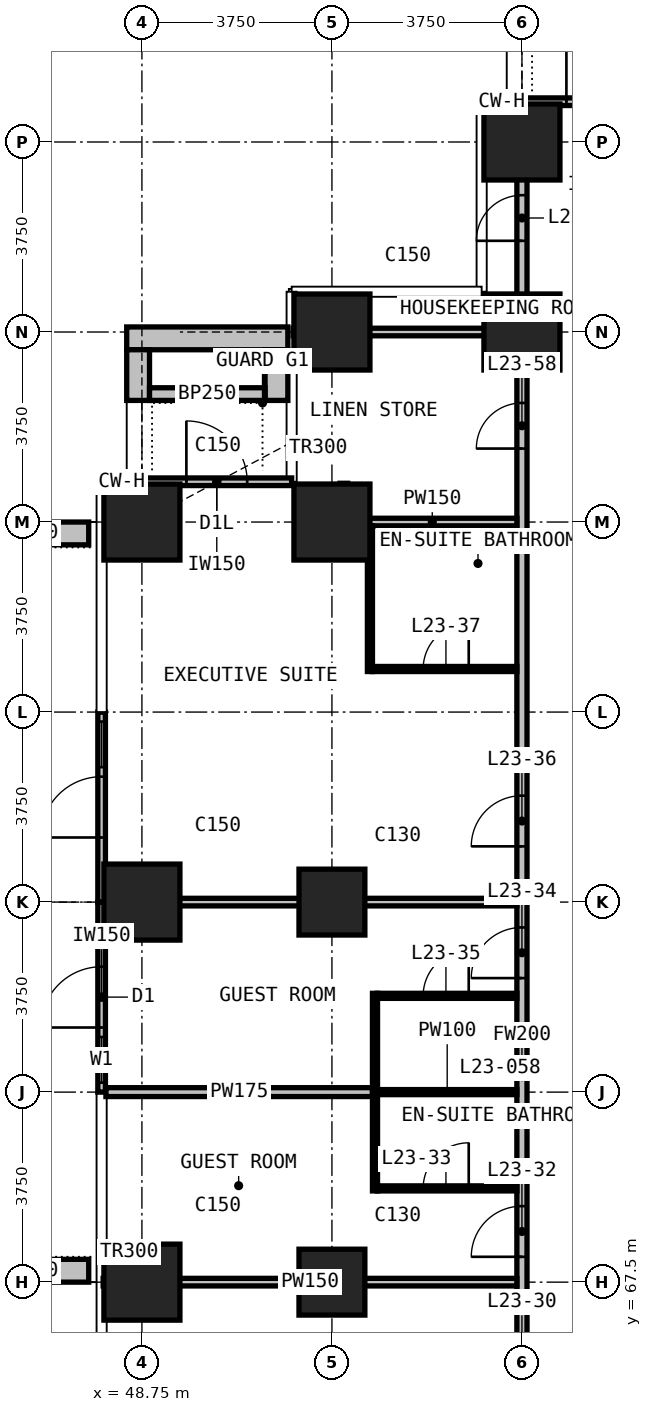
"""IFC4 building model, lengths in metres.
Left out: names, types, materials, properties, quantities, classifications, styles, units other than length and angle.
Written with IfcOpenShell. Run it as: python <this file> out.ifc"""

import sys

from ifc_helpers import new_model, si_unit, direction, frame, frame_2d, origin, origin_2d, place, context, subcontext, project, spatial, rectangle, extrude, element, fill, save


model = new_model("IFC4")
c1 = context("Model", 3, precision=1e-05, world=origin(), true_north=direction((0.0, 1.0)))
c2 = subcontext(c1, "Body", "Model", "MODEL_VIEW")
j1 = project(units=[si_unit("LENGTHUNIT", "METRE"), si_unit("PLANEANGLEUNIT", "RADIAN")], contexts=[c1])
p1 = place(None, origin())
s1 = spatial("IfcSite", under=j1, at=p1, CompositionType="ELEMENT")
p2 = place(p1, origin())
s2 = spatial("IfcBuilding", under=s1, at=p2, CompositionType="ELEMENT")
p3 = place(p2, frame((0.0, 0.0, 95.6)))
s3 = spatial("IfcBuildingStorey", under=s2, at=p3, CompositionType="ELEMENT", Elevation=95.6)
for number, where, z_axis, x_axis in (
    (1, (48.75, 67.5, 0.0), (0.0, 0.0, 1.0), (1.0, 0.0, 0.0)),
    (2, (48.75, 75.0, 0.0), (0.0, 0.0, 1.0), (1.0, 0.0, 0.0)),
    (3, (48.75, 82.5, 0.0), (0.0, 0.0, 1.0), (1.0, 0.0, 0.0)),
):
    element("IfcColumn", number, at=place(p3, frame(where, z_axis=z_axis, x_axis=x_axis)), inside=s3, PredefinedType="COLUMN", context=c2, shape_type="SweptSolid", body=[
        extrude(rectangle(XDim=1.5, YDim=1.5, at=origin_2d()), origin(), (0.0, 0.0, 1.0), 3.3),
    ])
for number, where, z_axis, x_axis in (
    (4, (52.5, 67.5, 0.0), (0.0, 0.0, 1.0), (1.0, 0.0, 0.0)),
    (5, (52.5, 75.0, 0.0), (0.0, 0.0, 1.0), (1.0, 0.0, 0.0)),
):
    element("IfcColumn", number, at=place(p3, frame(where, z_axis=z_axis, x_axis=x_axis)), inside=s3, PredefinedType="COLUMN", context=c2, shape_type="SweptSolid", body=[
        extrude(rectangle(XDim=1.3, YDim=1.3, at=origin_2d()), origin(), (0.0, 0.0, 1.0), 3.3),
    ])
for number, where, z_axis, x_axis in (
    (6, (52.5, 82.5, 0.0), (0.0, 0.0, 1.0), (1.0, 0.0, 0.0)),
    (7, (52.5, 86.25, 0.0), (0.0, 0.0, 1.0), (1.0, 0.0, 0.0)),
    (8, (56.25, 86.25, 0.0), (0.0, 0.0, 1.0), (1.0, 0.0, 0.0)),
    (9, (56.25, 90.0, 0.0), (0.0, 0.0, 1.0), (1.0, 0.0, 0.0)),
):
    element("IfcColumn", number, at=place(p3, frame(where, z_axis=z_axis, x_axis=x_axis)), inside=s3, PredefinedType="COLUMN", context=c2, shape_type="SweptSolid", body=[
        extrude(rectangle(XDim=1.5, YDim=1.5, at=origin_2d()), origin(), (0.0, 0.0, 1.0), 3.3),
    ])
p4 = place(p3, frame((56.25, 90.795, 0.0), z_axis=(0.0, 0.0, 1.0), x_axis=(1.0, 0.0, 0.0)))
e10 = element("IfcWall", 10, at=p4, inside=s3, PredefinedType="SOLIDWALL", context=c2, shape_type="SweptSolid", body=[
    extrude(rectangle(XDim=2.955, YDim=0.15, at=frame_2d((1.478, 0.0))), origin(), (0.0, 0.0, 1.0), 3.0),
])
p5 = place(p4, frame((0.877, 0.0, 0.0)))
e11 = element("IfcOpeningElement", 11, at=p5, cuts=e10, PredefinedType="OPENING", context=c2, shape_type="SweptSolid", body=[
    extrude(rectangle(XDim=1.2, YDim=2.4, at=frame_2d((0.6, 1.2))), frame((0.0, 0.085, 0.0), z_axis=(0.0, -1.0, 0.0), x_axis=(1.0, 0.0, 0.0)), (0.0, 0.0, 1.0), 0.17),
])
p6 = place(p3, frame((48.75, 83.295, 0.0), z_axis=(0.0, 0.0, 1.0), x_axis=(1.0, 0.0, 0.0)))
e12 = element("IfcWall", 12, at=p6, inside=s3, PredefinedType="SOLIDWALL", context=c2, shape_type="SweptSolid", body=[
    extrude(rectangle(XDim=2.955, YDim=0.15, at=frame_2d((1.478, 0.0))), origin(), (0.0, 0.0, 1.0), 3.0),
])
p7 = place(p6, frame((0.877, 0.0, 0.0)))
e13 = element("IfcOpeningElement", 13, at=p7, cuts=e12, PredefinedType="OPENING", context=c2, shape_type="SweptSolid", body=[
    extrude(rectangle(XDim=1.2, YDim=2.0, at=frame_2d((0.6, 1.0))), frame((0.0, 0.085, 0.0), z_axis=(0.0, -1.0, 0.0), x_axis=(1.0, 0.0, 0.0)), (0.0, 0.0, 1.0), 0.17),
])
p8 = place(p3, frame((47.955, 71.25, 0.0), z_axis=(0.0, 0.0, 1.0), x_axis=(0.0, 1.0, 0.0)))
e14 = element("IfcWall", 14, at=p8, inside=s3, PredefinedType="SOLIDWALL", context=c2, shape_type="SweptSolid", body=[
    extrude(rectangle(XDim=3.75, YDim=0.15, at=frame_2d((1.875, 0.0))), origin(), (0.0, 0.0, 1.0), 3.0),
])
p9 = place(p8, frame((0.188, 0.0, 0.1)))
e15 = element("IfcOpeningElement", 15, at=p9, cuts=e14, PredefinedType="OPENING", context=c2, shape_type="SweptSolid", body=[
    extrude(rectangle(XDim=0.9, YDim=2.4, at=frame_2d((0.45, 1.2))), frame((0.0, 0.085, 0.0), z_axis=(0.0, -1.0, 0.0), x_axis=(1.0, 0.0, 0.0)), (0.0, 0.0, 1.0), 0.17),
])
p10 = place(p8, frame((1.275, 0.0, 0.0)))
e16 = element("IfcOpeningElement", 16, at=p10, cuts=e14, PredefinedType="OPENING", context=c2, shape_type="SweptSolid", body=[
    extrude(rectangle(XDim=1.2, YDim=2.4, at=frame_2d((0.6, 1.2))), frame((0.0, 0.085, 0.0), z_axis=(0.0, -1.0, 0.0), x_axis=(1.0, 0.0, 0.0)), (0.0, 0.0, 1.0), 0.17),
])
p11 = place(p3, frame((47.955, 75.0, 0.0), z_axis=(0.0, 0.0, 1.0), x_axis=(0.0, 1.0, 0.0)))
e17 = element("IfcWall", 17, at=p11, inside=s3, PredefinedType="SOLIDWALL", context=c2, shape_type="SweptSolid", body=[
    extrude(rectangle(XDim=3.75, YDim=0.15, at=frame_2d((1.875, 0.0))), origin(), (0.0, 0.0, 1.0), 3.0),
])
p12 = place(p11, frame((1.275, 0.0, 0.0)))
e18 = element("IfcOpeningElement", 18, at=p12, cuts=e17, PredefinedType="OPENING", context=c2, shape_type="SweptSolid", body=[
    extrude(rectangle(XDim=1.2, YDim=2.4, at=frame_2d((0.6, 1.2))), frame((0.0, 0.085, 0.0), z_axis=(0.0, -1.0, 0.0), x_axis=(1.0, 0.0, 0.0)), (0.0, 0.0, 1.0), 0.17),
])
p13 = place(p11, frame((2.663, 0.0, 0.1)))
e19 = element("IfcOpeningElement", 19, at=p13, cuts=e17, PredefinedType="OPENING", context=c2, shape_type="SweptSolid", body=[
    extrude(rectangle(XDim=0.9, YDim=2.4, at=frame_2d((0.45, 1.2))), frame((0.0, 0.085, 0.0), z_axis=(0.0, -1.0, 0.0), x_axis=(1.0, 0.0, 0.0)), (0.0, 0.0, 1.0), 0.17),
])
p14 = place(p3, frame((48.45, 86.125, 0.0), z_axis=(0.0, 0.0, 1.0), x_axis=(1.0, 0.0, 0.0)))
e20 = element("IfcWall", 20, at=p14, inside=s3, PredefinedType="USERDEFINED", context=c2, shape_type="SweptSolid", body=[
    extrude(rectangle(XDim=3.18, YDim=0.45, at=frame_2d((1.59, 0.0))), origin(), (0.0, 0.0, 1.0), 1.1),
])
for number, where, z_axis, x_axis in (
    (21, (48.675, 84.9, 0.0), (0.0, 0.0, 1.0), (0.0, 1.0, 0.0)),
    (22, (51.405, 84.9, 0.0), (0.0, 0.0, 1.0), (0.0, 1.0, 0.0)),
):
    element("IfcWall", number, at=place(p3, frame(where, z_axis=z_axis, x_axis=x_axis)), inside=s3, PredefinedType="USERDEFINED", context=c2, shape_type="SweptSolid", body=[
        extrude(rectangle(XDim=1.0, YDim=0.45, at=frame_2d((0.5, 0.0))), origin(), (0.0, 0.0, 1.0), 1.1),
    ])
p15 = place(p3, frame((48.9, 85.025, 0.0), z_axis=(0.0, 0.0, 1.0), x_axis=(1.0, 0.0, 0.0)))
e23 = element("IfcWall", 23, at=p15, inside=s3, PredefinedType="USERDEFINED", context=c2, shape_type="SweptSolid", body=[
    extrude(rectangle(XDim=2.28, YDim=0.25, at=frame_2d((1.14, 0.0))), origin(), (0.0, 0.0, 1.0), 1.0),
])
for number, where, z_axis, x_axis in (
    (24, (47.7, 67.725, 0.0), (0.0, 0.0, 1.0), (-1.0, 0.0, 0.0)),
    (25, (47.7, 82.275, 0.0), (0.0, 0.0, 1.0), (-1.0, 0.0, 0.0)),
):
    element("IfcWall", number, at=place(p3, frame(where, z_axis=z_axis, x_axis=x_axis)), inside=s3, PredefinedType="USERDEFINED", context=c2, shape_type="SweptSolid", body=[
        extrude(rectangle(XDim=2.35, YDim=0.45, at=frame_2d((1.175, 0.0))), origin(), (0.0, 0.0, 1.0), 1.1),
    ])
p16 = place(p3, frame((56.25, 52.4, 0.0), z_axis=(0.0, 0.0, 1.0), x_axis=(0.0, 1.0, 0.0)))
e26 = element("IfcWall", 26, at=p16, inside=s3, PredefinedType="PARTITIONING", context=c2, shape_type="SweptSolid", body=[
    extrude(rectangle(XDim=38.31, YDim=0.2, at=frame_2d((19.155, 0.0))), origin(), (0.0, 0.0, 1.0), 3.0),
])
p17 = place(p16, frame((2.35, 0.0, 0.0)))
e27 = element("IfcOpeningElement", 27, at=p17, cuts=e26, PredefinedType="OPENING", context=c2, shape_type="SweptSolid", body=[
    extrude(rectangle(XDim=1.0, YDim=2.2, at=frame_2d((0.5, 1.1))), frame((0.0, 0.11, 0.0), z_axis=(0.0, -1.0, 0.0), x_axis=(1.0, 0.0, 0.0)), (0.0, 0.0, 1.0), 0.22),
])
p18 = place(p16, frame((4.35, 0.0, 0.0)))
e28 = element("IfcOpeningElement", 28, at=p18, cuts=e26, PredefinedType="OPENING", context=c2, shape_type="SweptSolid", body=[
    extrude(rectangle(XDim=1.0, YDim=2.2, at=frame_2d((0.5, 1.1))), frame((0.0, 0.11, 0.0), z_axis=(0.0, -1.0, 0.0), x_axis=(1.0, 0.0, 0.0)), (0.0, 0.0, 1.0), 0.22),
])
p19 = place(p16, frame((13.0, 0.0, 0.0)))
e29 = element("IfcOpeningElement", 29, at=p19, cuts=e26, PredefinedType="OPENING", context=c2, shape_type="SweptSolid", body=[
    extrude(rectangle(XDim=1.0, YDim=2.2, at=frame_2d((0.5, 1.1))), frame((0.0, 0.11, 0.0), z_axis=(0.0, -1.0, 0.0), x_axis=(1.0, 0.0, 0.0)), (0.0, 0.0, 1.0), 0.22),
])
p20 = place(p16, frame((15.6, 0.0, 0.0)))
e30 = element("IfcOpeningElement", 30, at=p20, cuts=e26, PredefinedType="OPENING", context=c2, shape_type="SweptSolid", body=[
    extrude(rectangle(XDim=1.0, YDim=2.2, at=frame_2d((0.5, 1.1))), frame((0.0, 0.11, 0.0), z_axis=(0.0, -1.0, 0.0), x_axis=(1.0, 0.0, 0.0)), (0.0, 0.0, 1.0), 0.22),
])
p21 = place(p16, frame((21.1, 0.0, 0.0)))
e31 = element("IfcOpeningElement", 31, at=p21, cuts=e26, PredefinedType="OPENING", context=c2, shape_type="SweptSolid", body=[
    extrude(rectangle(XDim=1.0, YDim=2.2, at=frame_2d((0.5, 1.1))), frame((0.0, 0.11, 0.0), z_axis=(0.0, -1.0, 0.0), x_axis=(1.0, 0.0, 0.0)), (0.0, 0.0, 1.0), 0.22),
])
p22 = place(p16, frame((23.7, 0.0, 0.0)))
e32 = element("IfcOpeningElement", 32, at=p22, cuts=e26, PredefinedType="OPENING", context=c2, shape_type="SweptSolid", body=[
    extrude(rectangle(XDim=1.0, YDim=2.2, at=frame_2d((0.5, 1.1))), frame((0.0, 0.11, 0.0), z_axis=(0.0, -1.0, 0.0), x_axis=(1.0, 0.0, 0.0)), (0.0, 0.0, 1.0), 0.22),
])
p23 = place(p16, frame((31.55, 0.0, 0.0)))
e33 = element("IfcOpeningElement", 33, at=p23, cuts=e26, PredefinedType="OPENING", context=c2, shape_type="SweptSolid", body=[
    extrude(rectangle(XDim=0.9, YDim=2.2, at=frame_2d((0.45, 1.1))), frame((0.0, 0.11, 0.0), z_axis=(0.0, -1.0, 0.0), x_axis=(1.0, 0.0, 0.0)), (0.0, 0.0, 1.0), 0.22),
])
p24 = place(p16, frame((35.65, 0.0, 0.0)))
e34 = element("IfcOpeningElement", 34, at=p24, cuts=e26, PredefinedType="OPENING", context=c2, shape_type="SweptSolid", body=[
    extrude(rectangle(XDim=0.9, YDim=2.2, at=frame_2d((0.45, 1.1))), frame((0.0, 0.11, 0.0), z_axis=(0.0, -1.0, 0.0), x_axis=(1.0, 0.0, 0.0)), (0.0, 0.0, 1.0), 0.22),
])
p25 = place(p3, frame((48.04, 71.25, 0.0), z_axis=(0.0, 0.0, 1.0), x_axis=(1.0, 0.0, 0.0)))
e35 = element("IfcWall", 35, at=p25, inside=s3, PredefinedType="PARTITIONING", context=c2, shape_type="SweptSolid", body=[
    extrude(rectangle(XDim=5.26, YDim=0.175, at=frame_2d((2.63, 0.0))), origin(), (0.0, 0.0, 1.0), 3.0),
])
p26 = place(p3, frame((47.985, 67.5, 0.0), z_axis=(0.0, 0.0, 1.0), x_axis=(1.0, 0.0, 0.0)))
e36 = element("IfcWall", 36, at=p26, inside=s3, PredefinedType="PARTITIONING", context=c2, shape_type="SweptSolid", body=[
    extrude(rectangle(XDim=8.165, YDim=0.15, at=frame_2d((4.083, 0.0))), origin(), (0.0, 0.0, 1.0), 3.0),
])
p27 = place(p3, frame((48.04, 75.0, 0.0), z_axis=(0.0, 0.0, 1.0), x_axis=(1.0, 0.0, 0.0)))
e37 = element("IfcWall", 37, at=p27, inside=s3, PredefinedType="PARTITIONING", context=c2, shape_type="SweptSolid", body=[
    extrude(rectangle(XDim=8.11, YDim=0.15, at=frame_2d((4.055, 0.0))), origin(), (0.0, 0.0, 1.0), 3.0),
])
p28 = place(p3, frame((52.81, 82.5, 0.0), z_axis=(0.0, 0.0, 1.0), x_axis=(1.0, 0.0, 0.0)))
e38 = element("IfcWall", 38, at=p28, inside=s3, PredefinedType="PARTITIONING", context=c2, shape_type="SweptSolid", body=[
    extrude(rectangle(XDim=3.34, YDim=0.15, at=frame_2d((1.67, 0.0))), origin(), (0.0, 0.0, 1.0), 3.0),
])
p29 = place(p3, frame((51.735, 86.25, 0.0), z_axis=(0.0, 0.0, 1.0), x_axis=(1.0, 0.0, 0.0)))
e39 = element("IfcWall", 39, at=p29, inside=s3, PredefinedType="PARTITIONING", context=c2, shape_type="SweptSolid", body=[
    extrude(rectangle(XDim=4.415, YDim=0.15, at=frame_2d((2.208, 0.0))), origin(), (0.0, 0.0, 1.0), 3.0),
])
p30 = place(p3, frame((52.735, 82.425, 0.0), z_axis=(0.0, 0.0, 1.0), x_axis=(0.0, 1.0, 0.0)))
e40 = element("IfcWall", 40, at=p30, inside=s3, PredefinedType="PARTITIONING", context=c2, shape_type="SweptSolid", body=[
    extrude(rectangle(XDim=0.84, YDim=0.15, at=frame_2d((0.42, 0.0))), origin(), (0.0, 0.0, 1.0), 3.0),
])
p31 = place(p3, frame((53.4, 69.35, 0.0), z_axis=(0.0, 0.0, 1.0), x_axis=(1.0, 0.0, 0.0)))
e41 = element("IfcWall", 41, at=p31, inside=s3, PredefinedType="PARTITIONING", context=c2, shape_type="SweptSolid", body=[
    extrude(rectangle(XDim=2.75, YDim=0.1, at=frame_2d((1.375, 0.0))), origin(), (0.0, 0.0, 1.0), 3.0),
])
p32 = place(p31, frame((0.9, 0.0, 0.0)))
e42 = element("IfcOpeningElement", 42, at=p32, cuts=e41, PredefinedType="OPENING", context=c2, shape_type="SweptSolid", body=[
    extrude(rectangle(XDim=0.9, YDim=2.2, at=frame_2d((0.45, 1.1))), frame((0.0, 0.06, 0.0), z_axis=(0.0, -1.0, 0.0), x_axis=(1.0, 0.0, 0.0)), (0.0, 0.0, 1.0), 0.12),
])
p33 = place(p3, frame((53.4, 71.25, 0.0), z_axis=(0.0, 0.0, 1.0), x_axis=(1.0, 0.0, 0.0)))
e43 = element("IfcWall", 43, at=p33, inside=s3, PredefinedType="PARTITIONING", context=c2, shape_type="SweptSolid", body=[
    extrude(rectangle(XDim=2.75, YDim=0.1, at=frame_2d((1.375, 0.0))), origin(), (0.0, 0.0, 1.0), 3.0),
])
p34 = place(p3, frame((53.4, 73.15, 0.0), z_axis=(0.0, 0.0, 1.0), x_axis=(1.0, 0.0, 0.0)))
e44 = element("IfcWall", 44, at=p34, inside=s3, PredefinedType="PARTITIONING", context=c2, shape_type="SweptSolid", body=[
    extrude(rectangle(XDim=2.75, YDim=0.1, at=frame_2d((1.375, 0.0))), origin(), (0.0, 0.0, 1.0), 3.0),
])
p35 = place(p34, frame((0.9, 0.0, 0.0)))
e45 = element("IfcOpeningElement", 45, at=p35, cuts=e44, PredefinedType="OPENING", context=c2, shape_type="SweptSolid", body=[
    extrude(rectangle(XDim=0.9, YDim=2.2, at=frame_2d((0.45, 1.1))), frame((0.0, 0.06, 0.0), z_axis=(0.0, -1.0, 0.0), x_axis=(1.0, 0.0, 0.0)), (0.0, 0.0, 1.0), 0.12),
])
p36 = place(p3, frame((53.3, 79.6, 0.0), z_axis=(0.0, 0.0, 1.0), x_axis=(1.0, 0.0, 0.0)))
e46 = element("IfcWall", 46, at=p36, inside=s3, PredefinedType="PARTITIONING", context=c2, shape_type="SweptSolid", body=[
    extrude(rectangle(XDim=2.85, YDim=0.1, at=frame_2d((1.425, 0.0))), origin(), (0.0, 0.0, 1.0), 3.0),
])
p37 = place(p36, frame((1.0, 0.0, 0.0)))
e47 = element("IfcOpeningElement", 47, at=p37, cuts=e46, PredefinedType="OPENING", context=c2, shape_type="SweptSolid", body=[
    extrude(rectangle(XDim=0.9, YDim=2.2, at=frame_2d((0.45, 1.1))), frame((0.0, 0.06, 0.0), z_axis=(0.0, -1.0, 0.0), x_axis=(1.0, 0.0, 0.0)), (0.0, 0.0, 1.0), 0.12),
])
p38 = place(p3, frame((53.25, 79.55, 0.0), z_axis=(0.0, 0.0, 1.0), x_axis=(0.0, 1.0, 0.0)))
e48 = element("IfcWall", 48, at=p38, inside=s3, PredefinedType="PARTITIONING", context=c2, shape_type="SweptSolid", body=[
    extrude(rectangle(XDim=2.875, YDim=0.1, at=frame_2d((1.438, 0.0))), origin(), (0.0, 0.0, 1.0), 3.0),
])
p39 = place(p3, frame((53.35, 69.3, 0.0), z_axis=(0.0, 0.0, 1.0), x_axis=(0.0, 1.0, 0.0)))
e49 = element("IfcWall", 49, at=p39, inside=s3, PredefinedType="PARTITIONING", context=c2, shape_type="SweptSolid", body=[
    extrude(rectangle(XDim=3.9, YDim=0.1, at=frame_2d((1.95, 0.0))), origin(), (0.0, 0.0, 1.0), 3.0),
])
p40 = place(p5, origin())
e50 = element("IfcDoor", 50, at=p40, inside=s3, OperationType="SINGLE_SWING_LEFT", PredefinedType="DOOR", context=c2, shape_type="SweptSolid", body=[
    extrude(rectangle(XDim=1.2, YDim=2.4, at=frame_2d((0.6, 1.2))), frame((0.0, 0.025, 0.0), z_axis=(0.0, -1.0, 0.0), x_axis=(1.0, 0.0, 0.0)), (0.0, 0.0, 1.0), 0.05),
])
fill(e11, e50)
p41 = place(p7, origin())
e51 = element("IfcDoor", 51, at=p41, inside=s3, OperationType="SINGLE_SWING_LEFT", PredefinedType="DOOR", context=c2, shape_type="SweptSolid", body=[
    extrude(rectangle(XDim=1.2, YDim=2.0, at=frame_2d((0.6, 1.0))), frame((0.0, 0.025, 0.0), z_axis=(0.0, -1.0, 0.0), x_axis=(1.0, 0.0, 0.0)), (0.0, 0.0, 1.0), 0.05),
])
fill(e13, e51)
p42 = place(p9, origin())
e52 = element("IfcWindow", 52, at=p42, inside=s3, PartitioningType="SINGLE_PANEL", PredefinedType="WINDOW", context=c2, shape_type="SweptSolid", body=[
    extrude(rectangle(XDim=0.9, YDim=2.4, at=frame_2d((0.45, 1.2))), frame((0.0, 0.03, 0.0), z_axis=(0.0, -1.0, 0.0), x_axis=(1.0, 0.0, 0.0)), (0.0, 0.0, 1.0), 0.06),
])
fill(e15, e52)
p43 = place(p10, origin())
e53 = element("IfcDoor", 53, at=p43, inside=s3, OperationType="SINGLE_SWING_LEFT", PredefinedType="DOOR", context=c2, shape_type="SweptSolid", body=[
    extrude(rectangle(XDim=1.2, YDim=2.4, at=frame_2d((0.6, 1.2))), frame((0.0, 0.025, 0.0), z_axis=(0.0, -1.0, 0.0), x_axis=(1.0, 0.0, 0.0)), (0.0, 0.0, 1.0), 0.05),
])
fill(e16, e53)
p44 = place(p12, origin())
e54 = element("IfcDoor", 54, at=p44, inside=s3, OperationType="SINGLE_SWING_LEFT", PredefinedType="DOOR", context=c2, shape_type="SweptSolid", body=[
    extrude(rectangle(XDim=1.2, YDim=2.4, at=frame_2d((0.6, 1.2))), frame((0.0, 0.025, 0.0), z_axis=(0.0, -1.0, 0.0), x_axis=(1.0, 0.0, 0.0)), (0.0, 0.0, 1.0), 0.05),
])
fill(e18, e54)
p45 = place(p13, origin())
e55 = element("IfcWindow", 55, at=p45, inside=s3, PartitioningType="SINGLE_PANEL", PredefinedType="WINDOW", context=c2, shape_type="SweptSolid", body=[
    extrude(rectangle(XDim=0.9, YDim=2.4, at=frame_2d((0.45, 1.2))), frame((0.0, 0.03, 0.0), z_axis=(0.0, -1.0, 0.0), x_axis=(1.0, 0.0, 0.0)), (0.0, 0.0, 1.0), 0.06),
])
fill(e19, e55)
p46 = place(p20, origin())
e56 = element("IfcDoor", 56, at=p46, inside=s3, OperationType="SINGLE_SWING_LEFT", PredefinedType="DOOR", context=c2, shape_type="SweptSolid", body=[
    extrude(rectangle(XDim=1.0, YDim=2.2, at=frame_2d((0.5, 1.1))), frame((0.0, 0.025, 0.0), z_axis=(0.0, -1.0, 0.0), x_axis=(1.0, 0.0, 0.0)), (0.0, 0.0, 1.0), 0.05),
])
fill(e30, e56)
p47 = place(p32, origin())
e57 = element("IfcDoor", 57, at=p47, inside=s3, OperationType="SINGLE_SWING_RIGHT", PredefinedType="DOOR", context=c2, shape_type="SweptSolid", body=[
    extrude(rectangle(XDim=0.9, YDim=2.2, at=frame_2d((0.45, 1.1))), frame((0.0, 0.025, 0.0), z_axis=(0.0, -1.0, 0.0), x_axis=(1.0, 0.0, 0.0)), (0.0, 0.0, 1.0), 0.05),
])
fill(e42, e57)
p48 = place(p21, origin())
e58 = element("IfcDoor", 58, at=p48, inside=s3, OperationType="SINGLE_SWING_RIGHT", PredefinedType="DOOR", context=c2, shape_type="SweptSolid", body=[
    extrude(rectangle(XDim=1.0, YDim=2.2, at=frame_2d((0.5, 1.1))), frame((0.0, 0.025, 0.0), z_axis=(0.0, -1.0, 0.0), x_axis=(1.0, 0.0, 0.0)), (0.0, 0.0, 1.0), 0.05),
])
fill(e31, e58)
p49 = place(p35, origin())
e59 = element("IfcDoor", 59, at=p49, inside=s3, OperationType="SINGLE_SWING_RIGHT", PredefinedType="DOOR", context=c2, shape_type="SweptSolid", body=[
    extrude(rectangle(XDim=0.9, YDim=2.2, at=frame_2d((0.45, 1.1))), frame((0.0, 0.025, 0.0), z_axis=(0.0, -1.0, 0.0), x_axis=(1.0, 0.0, 0.0)), (0.0, 0.0, 1.0), 0.05),
])
fill(e45, e59)
p50 = place(p22, origin())
e60 = element("IfcDoor", 60, at=p50, inside=s3, OperationType="SINGLE_SWING_LEFT", PredefinedType="DOOR", context=c2, shape_type="SweptSolid", body=[
    extrude(rectangle(XDim=1.0, YDim=2.2, at=frame_2d((0.5, 1.1))), frame((0.0, 0.025, 0.0), z_axis=(0.0, -1.0, 0.0), x_axis=(1.0, 0.0, 0.0)), (0.0, 0.0, 1.0), 0.05),
])
fill(e32, e60)
p51 = place(p37, origin())
e61 = element("IfcDoor", 61, at=p51, inside=s3, OperationType="SINGLE_SWING_RIGHT", PredefinedType="DOOR", context=c2, shape_type="SweptSolid", body=[
    extrude(rectangle(XDim=0.9, YDim=2.2, at=frame_2d((0.45, 1.1))), frame((0.0, 0.025, 0.0), z_axis=(0.0, -1.0, 0.0), x_axis=(1.0, 0.0, 0.0)), (0.0, 0.0, 1.0), 0.05),
])
fill(e47, e61)
p52 = place(p23, origin())
e62 = element("IfcDoor", 62, at=p52, inside=s3, OperationType="SINGLE_SWING_LEFT", PredefinedType="DOOR", context=c2, shape_type="SweptSolid", body=[
    extrude(rectangle(XDim=0.9, YDim=2.2, at=frame_2d((0.45, 1.1))), frame((0.0, 0.025, 0.0), z_axis=(0.0, -1.0, 0.0), x_axis=(1.0, 0.0, 0.0)), (0.0, 0.0, 1.0), 0.05),
])
fill(e33, e62)
p53 = place(p24, origin())
e63 = element("IfcDoor", 63, at=p53, inside=s3, OperationType="SINGLE_SWING_RIGHT", PredefinedType="DOOR", context=c2, shape_type="SweptSolid", body=[
    extrude(rectangle(XDim=0.9, YDim=2.2, at=frame_2d((0.45, 1.1))), frame((0.0, 0.025, 0.0), z_axis=(0.0, -1.0, 0.0), x_axis=(1.0, 0.0, 0.0)), (0.0, 0.0, 1.0), 0.05),
])
fill(e34, e63)
save(model, sys.argv[1])
